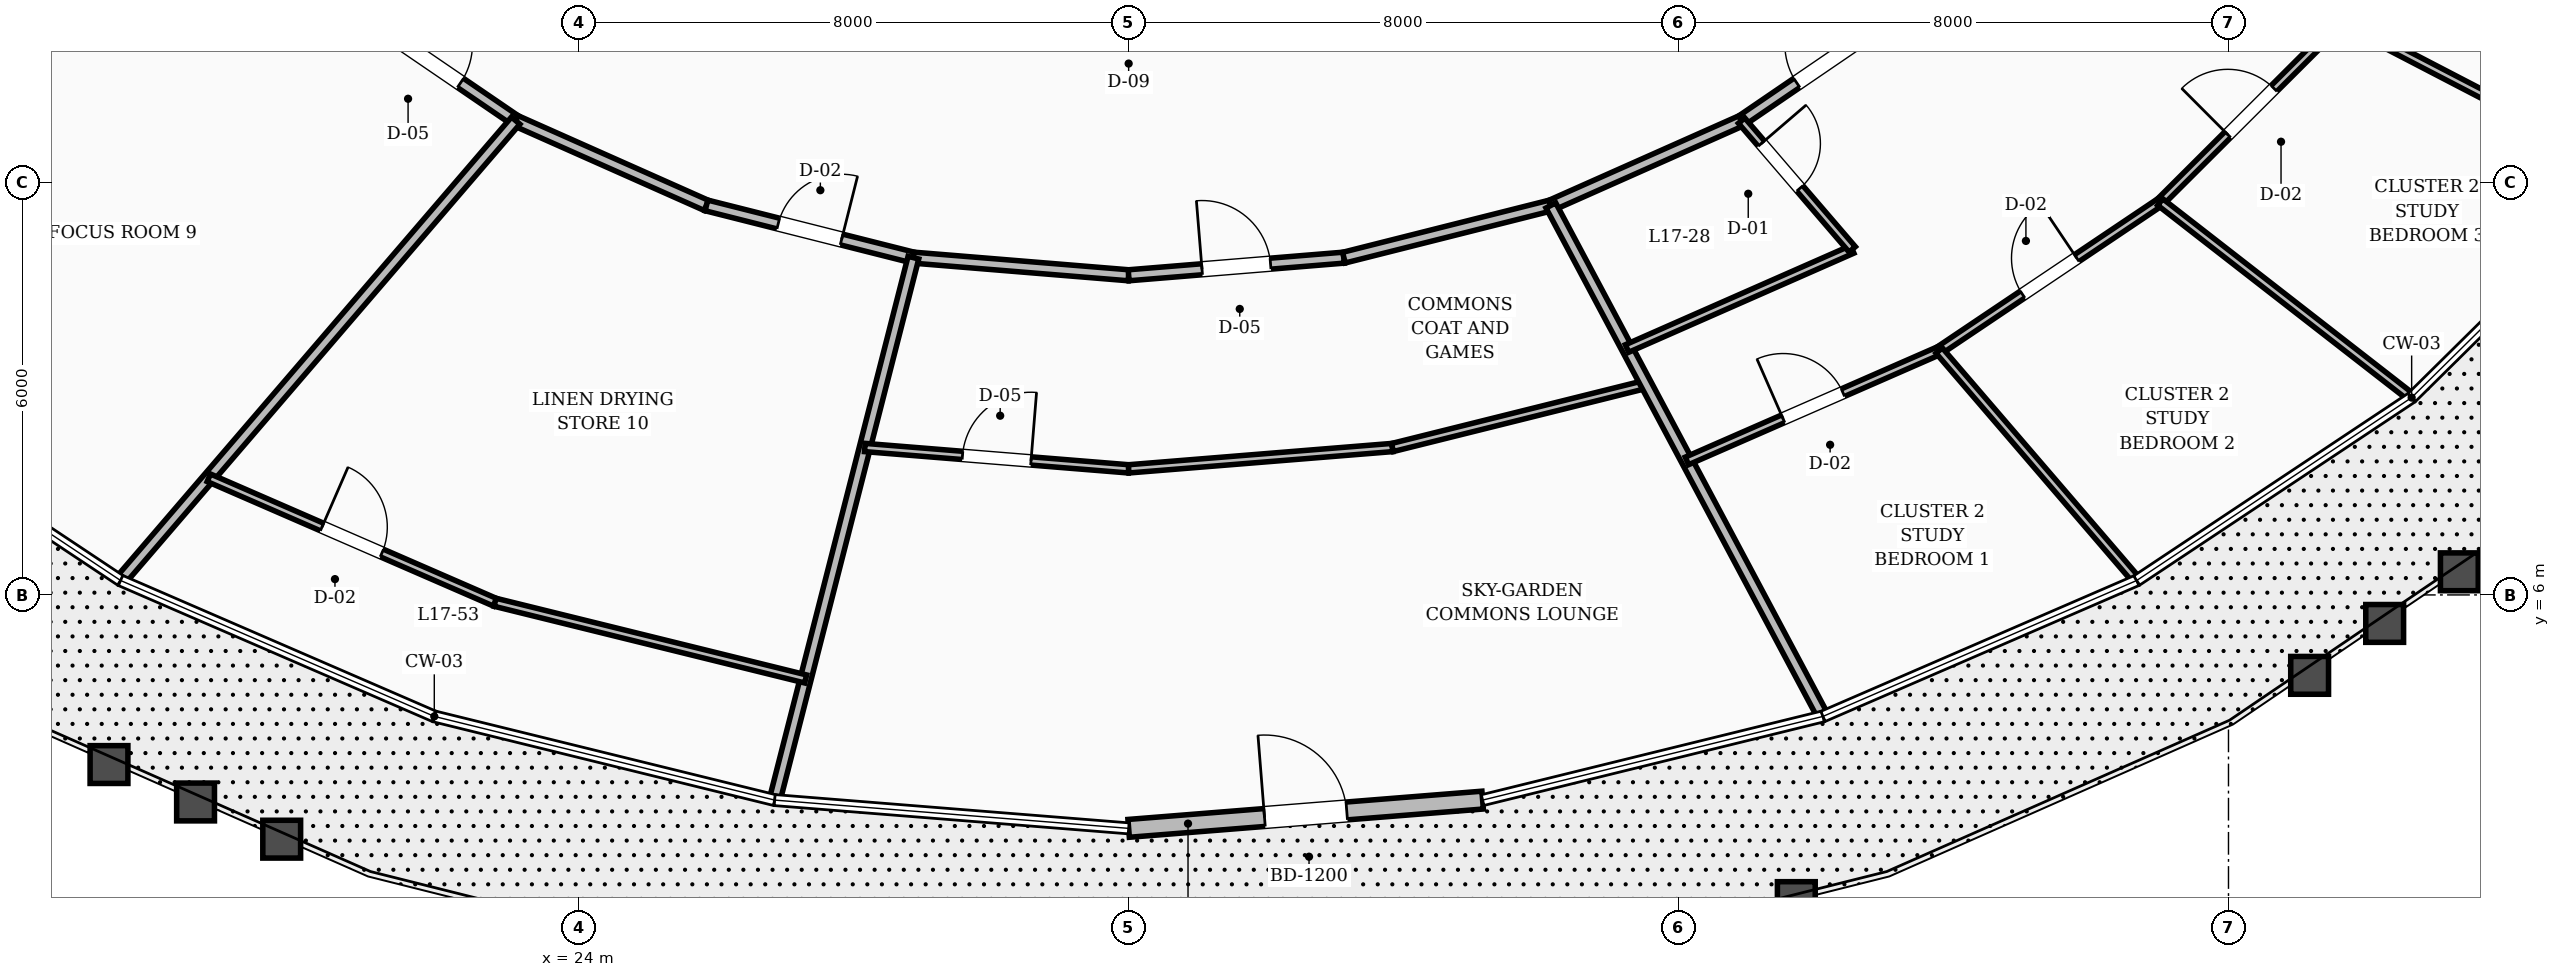
"""IFC4 building model, lengths in metres.
Left out: names, types, materials, properties, quantities, classifications, styles, units other than length and angle.
Written with IfcOpenShell. Run it as: python <this file> out.ifc"""

import sys

from ifc_helpers import new_model, si_unit, direction, frame, frame_2d, origin, place, context, subcontext, project, spatial, rectangle, extrude, element, fill, save


model = new_model("IFC4")
c1 = context("Model", 3, precision=1e-05, world=origin(), true_north=direction((0.0, 1.0)))
c2 = subcontext(c1, "Body", "Model", "MODEL_VIEW")
j1 = project(units=[si_unit("LENGTHUNIT", "METRE"), si_unit("PLANEANGLEUNIT", "RADIAN")], contexts=[c1])
p1 = place(None, origin())
s1 = spatial("IfcSite", under=j1, at=p1, CompositionType="ELEMENT")
p2 = place(p1, origin())
s2 = spatial("IfcBuilding", under=s1, at=p2, CompositionType="ELEMENT")
p3 = place(p2, frame((0.0, 0.0, 70.0)))
s3 = spatial("IfcBuildingStorey", under=s2, at=p3, CompositionType="ELEMENT", Elevation=70.0)
p4 = place(p3, frame((32.0, 2.604, 0.0), z_axis=(0.0, 0.0, 1.0), x_axis=(0.996828188341, 0.079583685069, 0.0)))
e1 = element("IfcWall", 1, at=p4, inside=s3, PredefinedType="STANDARD", context=c2, shape_type="SweptSolid", body=[
    extrude(rectangle(XDim=5.166, YDim=0.26, at=frame_2d((2.583, 0.0))), origin(), (0.0, 0.0, 1.0), 2.71),
])
p5 = place(p4, frame((1.983, 0.0, 0.0)))
e2 = element("IfcOpeningElement", 2, at=p5, cuts=e1, PredefinedType="OPENING", context=c2, shape_type="SweptSolid", body=[
    extrude(rectangle(XDim=1.2, YDim=2.15, at=frame_2d((0.6, 1.075))), frame((0.0, 0.14, 0.0), z_axis=(0.0, -1.0, 0.0), x_axis=(1.0, 0.0, 0.0)), (0.0, 0.0, 1.0), 0.28),
])
p6 = place(p3, frame((20.651, 14.56, 0.0), z_axis=(0.0, 0.0, 1.0), x_axis=(0.825929039072, -0.563774088104, 0.0)))
e3 = element("IfcWall", 3, at=p6, inside=s3, PredefinedType="SOLIDWALL", context=c2, shape_type="SweptSolid", body=[
    extrude(rectangle(XDim=2.945, YDim=0.16, at=frame_2d((1.472, 0.0))), origin(), (0.0, 0.0, 1.0), 2.71),
])
p7 = place(p6, frame((0.972, 0.0, 0.0)))
e4 = element("IfcOpeningElement", 4, at=p7, cuts=e3, PredefinedType="OPENING", context=c2, shape_type="SweptSolid", body=[
    extrude(rectangle(XDim=1.0, YDim=2.1, at=frame_2d((0.5, 1.05))), frame((0.0, 0.09, 0.0), z_axis=(0.0, -1.0, 0.0), x_axis=(1.0, 0.0, 0.0)), (0.0, 0.0, 1.0), 0.18),
])
p8 = place(p3, frame((23.083, 12.9, 0.0), z_axis=(0.0, 0.0, 1.0), x_axis=(0.913768445178, -0.406235434936, 0.0)))
e5 = element("IfcWall", 5, at=p8, inside=s3, PredefinedType="SOLIDWALL", context=c2, shape_type="SweptSolid", body=[
    extrude(rectangle(XDim=3.037, YDim=0.16, at=frame_2d((1.519, 0.0))), origin(), (0.0, 0.0, 1.0), 2.71),
])
p9 = place(p3, frame((25.858, 11.666, 0.0), z_axis=(0.0, 0.0, 1.0), x_axis=(0.969608333194, -0.244662380029, 0.0)))
e6 = element("IfcWall", 6, at=p9, inside=s3, PredefinedType="SOLIDWALL", context=c2, shape_type="SweptSolid", body=[
    extrude(rectangle(XDim=3.105, YDim=0.16, at=frame_2d((1.553, 0.0))), origin(), (0.0, 0.0, 1.0), 2.71),
])
p10 = place(p9, frame((1.078, 0.0, 0.0)))
e7 = element("IfcOpeningElement", 7, at=p10, cuts=e6, PredefinedType="OPENING", context=c2, shape_type="SweptSolid", body=[
    extrude(rectangle(XDim=0.95, YDim=2.1, at=frame_2d((0.475, 1.05))), frame((0.0, 0.09, 0.0), z_axis=(0.0, -1.0, 0.0), x_axis=(1.0, 0.0, 0.0)), (0.0, 0.0, 1.0), 0.18),
])
p11 = place(p3, frame((28.869, 10.906, 0.0), z_axis=(0.0, 0.0, 1.0), x_axis=(0.996658973252, -0.081675522876, 0.0)))
e8 = element("IfcWall", 8, at=p11, inside=s3, PredefinedType="SOLIDWALL", context=c2, shape_type="SweptSolid", body=[
    extrude(rectangle(XDim=3.142, YDim=0.16, at=frame_2d((1.571, 0.0))), origin(), (0.0, 0.0, 1.0), 2.71),
])
p12 = place(p3, frame((32.0, 10.65, 0.0), z_axis=(0.0, 0.0, 1.0), x_axis=(0.996658973252, 0.081675522876, 0.0)))
e9 = element("IfcWall", 9, at=p12, inside=s3, PredefinedType="SOLIDWALL", context=c2, shape_type="SweptSolid", body=[
    extrude(rectangle(XDim=3.142, YDim=0.16, at=frame_2d((1.571, 0.0))), origin(), (0.0, 0.0, 1.0), 2.71),
])
p13 = place(p12, frame((1.071, 0.0, 0.0)))
e10 = element("IfcOpeningElement", 10, at=p13, cuts=e9, PredefinedType="OPENING", context=c2, shape_type="SweptSolid", body=[
    extrude(rectangle(XDim=1.0, YDim=2.1, at=frame_2d((0.5, 1.05))), frame((0.0, 0.09, 0.0), z_axis=(0.0, -1.0, 0.0), x_axis=(1.0, 0.0, 0.0)), (0.0, 0.0, 1.0), 0.18),
])
p14 = place(p3, frame((35.131, 10.906, 0.0), z_axis=(0.0, 0.0, 1.0), x_axis=(0.969608333194, 0.244662380029, 0.0)))
e11 = element("IfcWall", 11, at=p14, inside=s3, PredefinedType="SOLIDWALL", context=c2, shape_type="SweptSolid", body=[
    extrude(rectangle(XDim=3.105, YDim=0.16, at=frame_2d((1.553, 0.0))), origin(), (0.0, 0.0, 1.0), 2.71),
])
p15 = place(p3, frame((38.142, 11.666, 0.0), z_axis=(0.0, 0.0, 1.0), x_axis=(0.913768445178, 0.406235434936, 0.0)))
e12 = element("IfcWall", 12, at=p15, inside=s3, PredefinedType="SOLIDWALL", context=c2, shape_type="SweptSolid", body=[
    extrude(rectangle(XDim=3.037, YDim=0.16, at=frame_2d((1.519, 0.0))), origin(), (0.0, 0.0, 1.0), 2.71),
])
p16 = place(p3, frame((40.917, 12.9, 0.0), z_axis=(0.0, 0.0, 1.0), x_axis=(0.825929039072, 0.563774088104, 0.0)))
e13 = element("IfcWall", 13, at=p16, inside=s3, PredefinedType="SOLIDWALL", context=c2, shape_type="SweptSolid", body=[
    extrude(rectangle(XDim=2.945, YDim=0.16, at=frame_2d((1.472, 0.0))), origin(), (0.0, 0.0, 1.0), 2.71),
])
p17 = place(p16, frame((0.972, 0.0, 0.0)))
e14 = element("IfcOpeningElement", 14, at=p17, cuts=e13, PredefinedType="OPENING", context=c2, shape_type="SweptSolid", body=[
    extrude(rectangle(XDim=1.0, YDim=2.1, at=frame_2d((0.5, 1.05))), frame((0.0, 0.09, 0.0), z_axis=(0.0, -1.0, 0.0), x_axis=(1.0, 0.0, 0.0)), (0.0, 0.0, 1.0), 0.18),
])
p18 = place(p3, frame((28.869, 10.906, 0.0), z_axis=(0.0, 0.0, 1.0), x_axis=(-0.247811526691, -0.968808261339, 0.0)))
e15 = element("IfcWall", 15, at=p18, inside=s3, PredefinedType="SOLIDWALL", context=c2, shape_type="SweptSolid", body=[
    extrude(rectangle(XDim=8.095, YDim=0.16, at=frame_2d((4.048, 0.0))), origin(), (0.0, 0.0, 1.0), 2.71),
])
p19 = place(p3, frame((28.162, 8.145, 0.0), z_axis=(0.0, 0.0, 1.0), x_axis=(0.996741873993, -0.080657526797, 0.0)))
e16 = element("IfcWall", 16, at=p19, inside=s3, PredefinedType="PARTITIONING", context=c2, shape_type="SweptSolid", body=[
    extrude(rectangle(XDim=3.85, YDim=0.12, at=frame_2d((1.925, 0.0))), origin(), (0.0, 0.0, 1.0), 2.71),
])
p20 = place(p19, frame((1.425, 0.0, 0.0)))
e17 = element("IfcOpeningElement", 17, at=p20, cuts=e16, PredefinedType="OPENING", context=c2, shape_type="SweptSolid", body=[
    extrude(rectangle(XDim=1.0, YDim=2.1, at=frame_2d((0.5, 1.05))), frame((0.0, 0.07, 0.0), z_axis=(0.0, -1.0, 0.0), x_axis=(1.0, 0.0, 0.0)), (0.0, 0.0, 1.0), 0.14),
])
p21 = place(p3, frame((32.0, 7.834, 0.0), z_axis=(0.0, 0.0, 1.0), x_axis=(0.996741873993, 0.080657526797, 0.0)))
e18 = element("IfcWall", 18, at=p21, inside=s3, PredefinedType="PARTITIONING", context=c2, shape_type="SweptSolid", body=[
    extrude(rectangle(XDim=3.85, YDim=0.12, at=frame_2d((1.925, 0.0))), origin(), (0.0, 0.0, 1.0), 2.71),
])
p22 = place(p3, frame((35.838, 8.145, 0.0), z_axis=(0.0, 0.0, 1.0), x_axis=(0.970304657853, 0.241886070181, 0.0)))
e19 = element("IfcWall", 19, at=p22, inside=s3, PredefinedType="PARTITIONING", context=c2, shape_type="SweptSolid", body=[
    extrude(rectangle(XDim=3.803, YDim=0.12, at=frame_2d((1.902, 0.0))), origin(), (0.0, 0.0, 1.0), 2.71),
])
p23 = place(p3, frame((38.142, 11.666, 0.0), z_axis=(0.0, 0.0, 1.0), x_axis=(0.470091700184, -0.882617580506, 0.0)))
e20 = element("IfcWall", 20, at=p23, inside=s3, PredefinedType="SOLIDWALL", context=c2, shape_type="SweptSolid", body=[
    extrude(rectangle(XDim=8.372, YDim=0.16, at=frame_2d((4.186, 0.0))), origin(), (0.0, 0.0, 1.0), 2.71),
])
p24 = place(p3, frame((39.25, 9.585, 0.0), z_axis=(0.0, 0.0, 1.0), x_axis=(0.915287872982, 0.402800334622, 0.0)))
e21 = element("IfcWall", 21, at=p24, inside=s3, PredefinedType="PARTITIONING", context=c2, shape_type="SweptSolid", body=[
    extrude(rectangle(XDim=3.579, YDim=0.12, at=frame_2d((1.79, 0.0))), origin(), (0.0, 0.0, 1.0), 2.71),
])
p25 = place(p3, frame((40.917, 12.9, 0.0), z_axis=(0.0, 0.0, 1.0), x_axis=(0.651653901419, -0.758516441988, 0.0)))
e22 = element("IfcWall", 22, at=p25, inside=s3, PredefinedType="PARTITIONING", context=c2, shape_type="SweptSolid", body=[
    extrude(rectangle(XDim=2.47, YDim=0.12, at=frame_2d((1.235, 0.0))), origin(), (0.0, 0.0, 1.0), 2.71),
])
p26 = place(p25, frame((0.44, 0.0, 0.0)))
e23 = element("IfcOpeningElement", 23, at=p26, cuts=e22, PredefinedType="OPENING", context=c2, shape_type="SweptSolid", body=[
    extrude(rectangle(XDim=0.86, YDim=2.1, at=frame_2d((0.43, 1.05))), frame((0.0, 0.07, 0.0), z_axis=(0.0, -1.0, 0.0), x_axis=(1.0, 0.0, 0.0)), (0.0, 0.0, 1.0), 0.14),
])
p27 = place(p3, frame((40.122, 7.95, 0.0), z_axis=(0.0, 0.0, 1.0), x_axis=(0.916161532069, 0.400809240359, 0.0)))
e24 = element("IfcWall", 24, at=p27, inside=s3, PredefinedType="PARTITIONING", context=c2, shape_type="SweptSolid", body=[
    extrude(rectangle(XDim=4.005, YDim=0.12, at=frame_2d((2.002, 0.0))), origin(), (0.0, 0.0, 1.0), 2.71),
])
p28 = place(p27, frame((1.527, 0.0, 0.0)))
e25 = element("IfcOpeningElement", 25, at=p28, cuts=e24, PredefinedType="OPENING", context=c2, shape_type="SweptSolid", body=[
    extrude(rectangle(XDim=0.95, YDim=2.1, at=frame_2d((0.475, 1.05))), frame((0.0, 0.07, 0.0), z_axis=(0.0, -1.0, 0.0), x_axis=(1.0, 0.0, 0.0)), (0.0, 0.0, 1.0), 0.14),
])
p29 = place(p3, frame((43.791, 9.555, 0.0), z_axis=(0.0, 0.0, 1.0), x_axis=(0.830067374371, 0.557663118742, 0.0)))
e26 = element("IfcWall", 26, at=p29, inside=s3, PredefinedType="PARTITIONING", context=c2, shape_type="SweptSolid", body=[
    extrude(rectangle(XDim=3.875, YDim=0.12, at=frame_2d((1.937, 0.0))), origin(), (0.0, 0.0, 1.0), 2.71),
])
p30 = place(p29, frame((1.462, 0.0, 0.0)))
e27 = element("IfcOpeningElement", 27, at=p30, cuts=e26, PredefinedType="OPENING", context=c2, shape_type="SweptSolid", body=[
    extrude(rectangle(XDim=0.95, YDim=2.1, at=frame_2d((0.475, 1.05))), frame((0.0, 0.07, 0.0), z_axis=(0.0, -1.0, 0.0), x_axis=(1.0, 0.0, 0.0)), (0.0, 0.0, 1.0), 0.14),
])
p31 = place(p3, frame((43.791, 9.555, 0.0), z_axis=(0.0, 0.0, 1.0), x_axis=(0.651667093556, -0.758505108207, 0.0)))
e28 = element("IfcWall", 28, at=p31, inside=s3, PredefinedType="PARTITIONING", context=c2, shape_type="SweptSolid", body=[
    extrude(rectangle(XDim=4.36, YDim=0.12, at=frame_2d((2.18, 0.0))), origin(), (0.0, 0.0, 1.0), 2.71),
])
p32 = place(p3, frame((47.007, 11.716, 0.0), z_axis=(0.0, 0.0, 1.0), x_axis=(0.70802306057, 0.706189312933, 0.0)))
e29 = element("IfcWall", 29, at=p32, inside=s3, PredefinedType="PARTITIONING", context=c2, shape_type="SweptSolid", body=[
    extrude(rectangle(XDim=3.728, YDim=0.12, at=frame_2d((1.864, 0.0))), origin(), (0.0, 0.0, 1.0), 2.71),
])
p33 = place(p32, frame((1.389, 0.0, 0.0)))
e30 = element("IfcOpeningElement", 30, at=p33, cuts=e29, PredefinedType="OPENING", context=c2, shape_type="SweptSolid", body=[
    extrude(rectangle(XDim=0.95, YDim=2.1, at=frame_2d((0.475, 1.05))), frame((0.0, 0.07, 0.0), z_axis=(0.0, -1.0, 0.0), x_axis=(1.0, 0.0, 0.0)), (0.0, 0.0, 1.0), 0.14),
])
p34 = place(p3, frame((47.007, 11.716, 0.0), z_axis=(0.0, 0.0, 1.0), x_axis=(0.789369425369, -0.613918488313, 0.0)))
e31 = element("IfcWall", 31, at=p34, inside=s3, PredefinedType="PARTITIONING", context=c2, shape_type="SweptSolid", body=[
    extrude(rectangle(XDim=4.583, YDim=0.12, at=frame_2d((2.292, 0.0))), origin(), (0.0, 0.0, 1.0), 2.71),
])
p35 = place(p3, frame((49.646, 14.348, 0.0), z_axis=(0.0, 0.0, 1.0), x_axis=(0.887345925729, -0.461104335366, 0.0)))
e32 = element("IfcWall", 32, at=p35, inside=s3, PredefinedType="PARTITIONING", context=c2, shape_type="SweptSolid", body=[
    extrude(rectangle(XDim=4.797, YDim=0.12, at=frame_2d((2.398, 0.0))), origin(), (0.0, 0.0, 1.0), 2.71),
])
p36 = place(p3, frame((18.655, 16.583, 0.0), z_axis=(0.0, 0.0, 1.0), x_axis=(-0.884569100485, -0.466409162074, 0.0)))
e33 = element("IfcWall", 33, at=p36, inside=s3, PredefinedType="SOLIDWALL", context=c2, shape_type="SweptSolid", body=[
    extrude(rectangle(XDim=10.201, YDim=0.16, at=frame_2d((5.101, 0.0))), origin(), (0.0, 0.0, 1.0), 2.71),
])
p37 = place(p3, frame((23.083, 12.9, 0.0), z_axis=(0.0, 0.0, 1.0), x_axis=(-0.651664407247, -0.758507416133, 0.0)))
e34 = element("IfcWall", 34, at=p37, inside=s3, PredefinedType="SOLIDWALL", context=c2, shape_type="SweptSolid", body=[
    extrude(rectangle(XDim=8.77, YDim=0.16, at=frame_2d((4.385, 0.0))), origin(), (0.0, 0.0, 1.0), 2.71),
])
p38 = place(p3, frame((18.619, 7.704, 0.0), z_axis=(0.0, 0.0, 1.0), x_axis=(0.917023892151, -0.398832272044, 0.0)))
e35 = element("IfcWall", 35, at=p38, inside=s3, PredefinedType="PARTITIONING", context=c2, shape_type="SweptSolid", body=[
    extrude(rectangle(XDim=4.541, YDim=0.12, at=frame_2d((2.271, 0.0))), origin(), (0.0, 0.0, 1.0), 2.71),
])
p39 = place(p38, frame((1.795, 0.0, 0.0)))
e36 = element("IfcOpeningElement", 36, at=p39, cuts=e35, PredefinedType="OPENING", context=c2, shape_type="SweptSolid", body=[
    extrude(rectangle(XDim=0.95, YDim=2.1, at=frame_2d((0.475, 1.05))), frame((0.0, 0.07, 0.0), z_axis=(0.0, -1.0, 0.0), x_axis=(1.0, 0.0, 0.0)), (0.0, 0.0, 1.0), 0.14),
])
p40 = place(p3, frame((22.783, 5.893, 0.0), z_axis=(0.0, 0.0, 1.0), x_axis=(0.970851129806, -0.239683298864, 0.0)))
e37 = element("IfcWall", 37, at=p40, inside=s3, PredefinedType="PARTITIONING", context=c2, shape_type="SweptSolid", body=[
    extrude(rectangle(XDim=4.654, YDim=0.12, at=frame_2d((2.327, 0.0))), origin(), (0.0, 0.0, 1.0), 2.71),
])
p41 = place(p5, origin())
e38 = element("IfcDoor", 38, at=p41, inside=s3, OperationType="SINGLE_SWING_LEFT", PredefinedType="DOOR", context=c2, shape_type="SweptSolid", body=[
    extrude(rectangle(XDim=1.2, YDim=2.15, at=frame_2d((0.6, 1.075))), frame((0.0, 0.025, 0.0), z_axis=(0.0, -1.0, 0.0), x_axis=(1.0, 0.0, 0.0)), (0.0, 0.0, 1.0), 0.05),
])
fill(e2, e38)
p42 = place(p13, origin())
e39 = element("IfcDoor", 39, at=p42, inside=s3, OperationType="SINGLE_SWING_LEFT", PredefinedType="DOOR", context=c2, shape_type="SweptSolid", body=[
    extrude(rectangle(XDim=1.0, YDim=2.1, at=frame_2d((0.5, 1.05))), frame((0.0, 0.025, 0.0), z_axis=(0.0, -1.0, 0.0), x_axis=(1.0, 0.0, 0.0)), (0.0, 0.0, 1.0), 0.05),
])
fill(e10, e39)
p43 = place(p20, origin())
e40 = element("IfcDoor", 40, at=p43, inside=s3, OperationType="SINGLE_SWING_RIGHT", PredefinedType="DOOR", context=c2, shape_type="SweptSolid", body=[
    extrude(rectangle(XDim=1.0, YDim=2.1, at=frame_2d((0.5, 1.05))), frame((0.0, 0.025, 0.0), z_axis=(0.0, -1.0, 0.0), x_axis=(1.0, 0.0, 0.0)), (0.0, 0.0, 1.0), 0.05),
])
fill(e17, e40)
p44 = place(p26, origin())
e41 = element("IfcDoor", 41, at=p44, inside=s3, OperationType="SINGLE_SWING_LEFT", PredefinedType="DOOR", context=c2, shape_type="SweptSolid", body=[
    extrude(rectangle(XDim=0.86, YDim=2.1, at=frame_2d((0.43, 1.05))), frame((0.0, 0.025, 0.0), z_axis=(0.0, -1.0, 0.0), x_axis=(1.0, 0.0, 0.0)), (0.0, 0.0, 1.0), 0.05),
])
fill(e23, e41)
p45 = place(p17, origin())
e42 = element("IfcDoor", 42, at=p45, inside=s3, OperationType="SINGLE_SWING_RIGHT", PredefinedType="DOOR", context=c2, shape_type="SweptSolid", body=[
    extrude(rectangle(XDim=1.0, YDim=2.1, at=frame_2d((0.5, 1.05))), frame((0.0, 0.025, 0.0), z_axis=(0.0, -1.0, 0.0), x_axis=(1.0, 0.0, 0.0)), (0.0, 0.0, 1.0), 0.05),
])
fill(e14, e42)
p46 = place(p28, origin())
e43 = element("IfcDoor", 43, at=p46, inside=s3, OperationType="SINGLE_SWING_LEFT", PredefinedType="DOOR", context=c2, shape_type="SweptSolid", body=[
    extrude(rectangle(XDim=0.95, YDim=2.1, at=frame_2d((0.475, 1.05))), frame((0.0, 0.025, 0.0), z_axis=(0.0, -1.0, 0.0), x_axis=(1.0, 0.0, 0.0)), (0.0, 0.0, 1.0), 0.05),
])
fill(e25, e43)
p47 = place(p30, origin())
e44 = element("IfcDoor", 44, at=p47, inside=s3, OperationType="SINGLE_SWING_RIGHT", PredefinedType="DOOR", context=c2, shape_type="SweptSolid", body=[
    extrude(rectangle(XDim=0.95, YDim=2.1, at=frame_2d((0.475, 1.05))), frame((0.0, 0.025, 0.0), z_axis=(0.0, -1.0, 0.0), x_axis=(1.0, 0.0, 0.0)), (0.0, 0.0, 1.0), 0.05),
])
fill(e27, e44)
p48 = place(p33, origin())
e45 = element("IfcDoor", 45, at=p48, inside=s3, OperationType="SINGLE_SWING_LEFT", PredefinedType="DOOR", context=c2, shape_type="SweptSolid", body=[
    extrude(rectangle(XDim=0.95, YDim=2.1, at=frame_2d((0.475, 1.05))), frame((0.0, 0.025, 0.0), z_axis=(0.0, -1.0, 0.0), x_axis=(1.0, 0.0, 0.0)), (0.0, 0.0, 1.0), 0.05),
])
fill(e30, e45)
p49 = place(p7, origin())
e46 = element("IfcDoor", 46, at=p49, inside=s3, OperationType="SINGLE_SWING_LEFT", PredefinedType="DOOR", context=c2, shape_type="SweptSolid", body=[
    extrude(rectangle(XDim=1.0, YDim=2.1, at=frame_2d((0.5, 1.05))), frame((0.0, 0.025, 0.0), z_axis=(0.0, -1.0, 0.0), x_axis=(1.0, 0.0, 0.0)), (0.0, 0.0, 1.0), 0.05),
])
fill(e4, e46)
p50 = place(p10, origin())
e47 = element("IfcDoor", 47, at=p50, inside=s3, OperationType="SINGLE_SWING_RIGHT", PredefinedType="DOOR", context=c2, shape_type="SweptSolid", body=[
    extrude(rectangle(XDim=0.95, YDim=2.1, at=frame_2d((0.475, 1.05))), frame((0.0, 0.025, 0.0), z_axis=(0.0, -1.0, 0.0), x_axis=(1.0, 0.0, 0.0)), (0.0, 0.0, 1.0), 0.05),
])
fill(e7, e47)
p51 = place(p39, origin())
e48 = element("IfcDoor", 48, at=p51, inside=s3, OperationType="SINGLE_SWING_LEFT", PredefinedType="DOOR", context=c2, shape_type="SweptSolid", body=[
    extrude(rectangle(XDim=0.95, YDim=2.1, at=frame_2d((0.475, 1.05))), frame((0.0, 0.025, 0.0), z_axis=(0.0, -1.0, 0.0), x_axis=(1.0, 0.0, 0.0)), (0.0, 0.0, 1.0), 0.05),
])
fill(e36, e48)
save(model, sys.argv[1])
